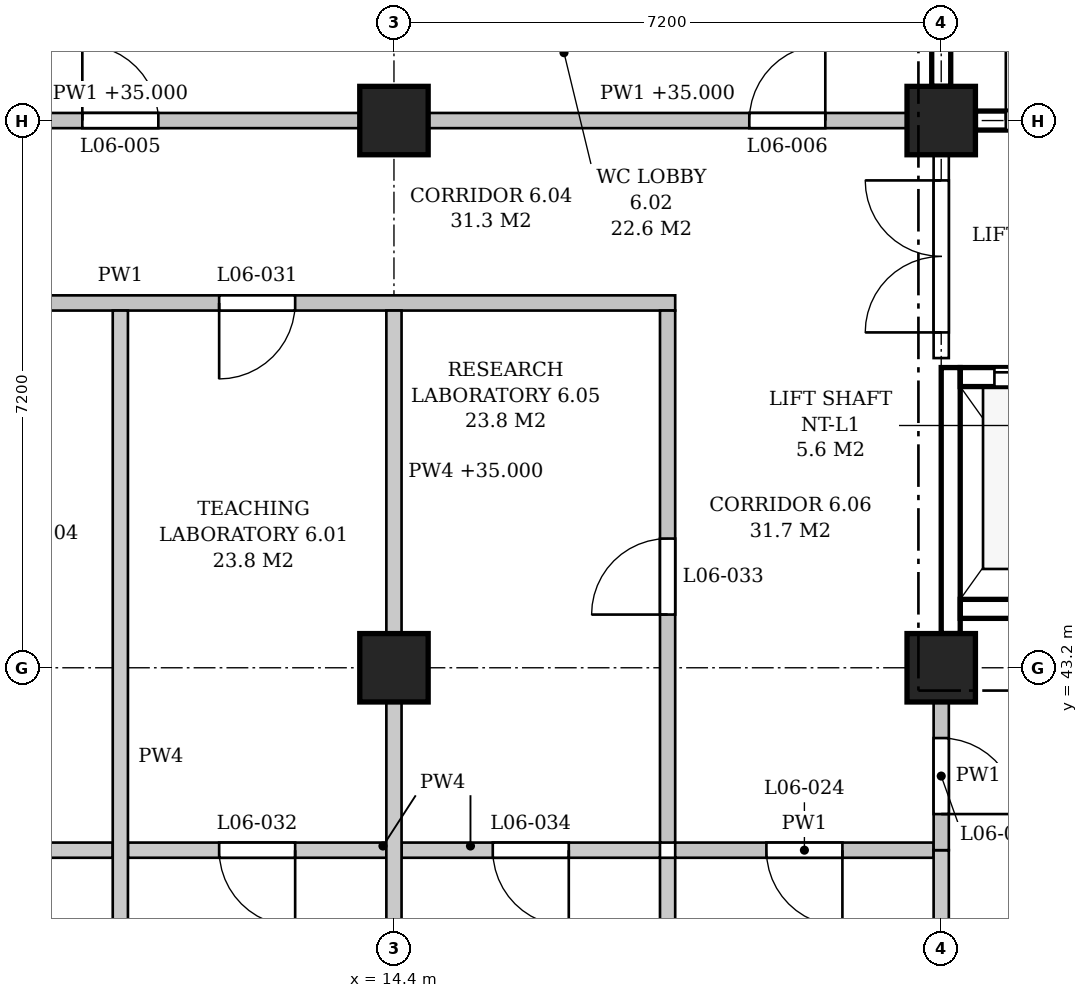
"""IFC4 building model, lengths in metres.
Left out: names, types, materials, properties, quantities, classifications, styles, units other than length and angle.
Written with IfcOpenShell. Run it as: python <this file> out.ifc"""

import sys

from ifc_helpers import new_model, si_unit, direction, frame, frame_2d, origin, origin_2d, place, context, subcontext, project, spatial, polyline, rectangle, outline, extrude, element, fill, save


model = new_model("IFC4")
c1 = context("Model", 3, precision=1e-05, world=origin(), true_north=direction((0.0, 1.0)))
c2 = subcontext(c1, "Body", "Model", "MODEL_VIEW")
j1 = project(units=[si_unit("LENGTHUNIT", "METRE"), si_unit("PLANEANGLEUNIT", "RADIAN")], contexts=[c1])
p1 = place(None, origin())
s1 = spatial("IfcSite", under=j1, at=p1, CompositionType="ELEMENT")
p2 = place(p1, origin())
s2 = spatial("IfcBuilding", under=s1, at=p2, CompositionType="ELEMENT")
p3 = place(p2, frame((0.0, 0.0, 31.2)))
s3 = spatial("IfcBuildingStorey", under=s2, at=p3, CompositionType="ELEMENT", Elevation=31.2)
for number, where, z_axis, x_axis in (
    (1, (14.4, 43.2, 0.0), (0.0, 0.0, 1.0), (1.0, 0.0, 0.0)),
    (2, (14.4, 50.4, 0.0), (0.0, 0.0, 1.0), (1.0, 0.0, 0.0)),
    (3, (21.6, 43.2, 0.0), (0.0, 0.0, 1.0), (1.0, 0.0, 0.0)),
    (4, (21.6, 50.4, 0.0), (0.0, 0.0, 1.0), (1.0, 0.0, 0.0)),
):
    element("IfcColumn", number, at=place(p3, frame(where, z_axis=z_axis, x_axis=x_axis)), inside=s3, PredefinedType="COLUMN", context=c2, shape_type="SweptSolid", body=[
        extrude(rectangle(XDim=0.9, YDim=0.9, at=origin_2d()), origin(), (0.0, 0.0, 1.0), 4.8),
    ])
p4 = place(p3, frame((22.05, 50.4, 0.0), z_axis=(0.0, 0.0, 1.0), x_axis=(1.0, 0.0, 0.0)))
e5 = element("IfcWall", 5, at=p4, inside=s3, PredefinedType="SHEAR", context=c2, shape_type="SweptSolid", body=[
    extrude(rectangle(XDim=6.3, YDim=0.25, at=frame_2d((3.15, 0.0))), origin(), (0.0, 0.0, 1.0), 3.8),
])
p5 = place(p4, frame((0.4, 0.0, 0.0)))
e6 = element("IfcOpeningElement", 6, at=p5, cuts=e5, PredefinedType="OPENING", context=c2, shape_type="SweptSolid", body=[
    extrude(rectangle(XDim=1.1, YDim=2.1, at=frame_2d((0.55, 1.05))), frame((0.0, 0.135, 0.0), z_axis=(0.0, -1.0, 0.0), x_axis=(1.0, 0.0, 0.0)), (0.0, 0.0, 1.0), 0.27),
])
p6 = place(p3, frame((21.6, 50.85, 0.0), z_axis=(0.0, 0.0, 1.0), x_axis=(0.0, 1.0, 0.0)))
e7 = element("IfcWall", 7, at=p6, inside=s3, PredefinedType="SHEAR", context=c2, shape_type="SweptSolid", body=[
    extrude(rectangle(XDim=6.3, YDim=0.25, at=frame_2d((3.15, 0.0))), origin(), (0.0, 0.0, 1.0), 3.8),
])
p7 = place(p3, frame((21.725, 43.65, -0.25), z_axis=(0.0, 0.0, 1.0), x_axis=(0.0, 1.0, 0.0)))
e8 = element("IfcWall", 8, at=p7, inside=s3, PredefinedType="SHEAR", context=c2, shape_type="SweptSolid", body=[
    extrude(rectangle(XDim=3.5, YDim=0.25, at=frame_2d((1.75, 0.0))), origin(), (0.0, 0.0, 1.0), 4.05),
])
p8 = place(p3, frame((21.85, 47.025, -0.25), z_axis=(0.0, 0.0, 1.0), x_axis=(1.0, 0.0, 0.0)))
e9 = element("IfcWall", 9, at=p8, inside=s3, PredefinedType="SHEAR", context=c2, shape_type="SweptSolid", body=[
    extrude(rectangle(XDim=2.0, YDim=0.25, at=frame_2d((1.0, 0.0))), origin(), (0.0, 0.0, 1.0), 4.8),
])
p9 = place(p8, frame((0.45, 0.0, 0.25)))
e10 = element("IfcOpeningElement", 10, at=p9, cuts=e9, PredefinedType="OPENING", context=c2, shape_type="SweptSolid", body=[
    extrude(rectangle(XDim=1.1, YDim=2.1, at=frame_2d((0.55, 1.05))), frame((0.0, 0.135, 0.0), z_axis=(0.0, -1.0, 0.0), x_axis=(1.0, 0.0, 0.0)), (0.0, 0.0, 1.0), 0.27),
])
p10 = place(p3, frame((21.85, 43.975, -0.25), z_axis=(0.0, 0.0, 1.0), x_axis=(1.0, 0.0, 0.0)))
e11 = element("IfcWall", 11, at=p10, inside=s3, PredefinedType="SHEAR", context=c2, shape_type="SweptSolid", body=[
    extrude(rectangle(XDim=2.0, YDim=0.25, at=frame_2d((1.0, 0.0))), origin(), (0.0, 0.0, 1.0), 4.8),
])
p11 = place(p3, frame((3.7, 40.8, 0.0), z_axis=(0.0, 0.0, 1.0), x_axis=(1.0, 0.0, 0.0)))
e12 = element("IfcWall", 12, at=p11, inside=s3, PredefinedType="PARTITIONING", context=c2, shape_type="SweptSolid", body=[
    extrude(outline(polyline([(0.0, 0.0), (7.0, 0.0), (7.0, 4.55), (3.75, 4.55), (3.75, 3.8), (3.25, 3.8), (3.25, 4.55), (0.0, 4.55), (0.0, 0.0)])), frame((0.0, 0.1, 0.0), z_axis=(0.0, -1.0, 0.0), x_axis=(1.0, 0.0, 0.0)), (0.0, 0.0, 1.0), 0.2),
])
p12 = place(p11, frame((1.25, 0.0, 0.0)))
e13 = element("IfcOpeningElement", 13, at=p12, cuts=e12, PredefinedType="OPENING", context=c2, shape_type="SweptSolid", body=[
    extrude(rectangle(XDim=1.0, YDim=2.1, at=frame_2d((0.5, 1.05))), frame((0.0, 0.11, 0.0), z_axis=(0.0, -1.0, 0.0), x_axis=(1.0, 0.0, 0.0)), (0.0, 0.0, 1.0), 0.22),
])
p13 = place(p11, frame((4.75, 0.0, 0.0)))
e14 = element("IfcOpeningElement", 14, at=p13, cuts=e12, PredefinedType="OPENING", context=c2, shape_type="SweptSolid", body=[
    extrude(rectangle(XDim=1.0, YDim=2.1, at=frame_2d((0.5, 1.05))), frame((0.0, 0.11, 0.0), z_axis=(0.0, -1.0, 0.0), x_axis=(1.0, 0.0, 0.0)), (0.0, 0.0, 1.0), 0.22),
])
p14 = place(p3, frame((10.9, 40.8, 0.0), z_axis=(0.0, 0.0, 1.0), x_axis=(1.0, 0.0, 0.0)))
e15 = element("IfcWall", 15, at=p14, inside=s3, PredefinedType="PARTITIONING", context=c2, shape_type="SweptSolid", body=[
    extrude(outline(polyline([(0.0, 0.0), (3.4, 0.0), (3.4, 3.8), (3.25, 3.8), (3.25, 4.55), (0.0, 4.55), (0.0, 0.0)])), frame((0.0, 0.1, 0.0), z_axis=(0.0, -1.0, 0.0), x_axis=(1.0, 0.0, 0.0)), (0.0, 0.0, 1.0), 0.2),
])
p15 = place(p14, frame((1.2, 0.0, 0.0)))
e16 = element("IfcOpeningElement", 16, at=p15, cuts=e15, PredefinedType="OPENING", context=c2, shape_type="SweptSolid", body=[
    extrude(rectangle(XDim=1.0, YDim=2.1, at=frame_2d((0.5, 1.05))), frame((0.0, 0.11, 0.0), z_axis=(0.0, -1.0, 0.0), x_axis=(1.0, 0.0, 0.0)), (0.0, 0.0, 1.0), 0.22),
])
p16 = place(p3, frame((14.5, 40.8, 0.0), z_axis=(0.0, 0.0, 1.0), x_axis=(1.0, 0.0, 0.0)))
e17 = element("IfcWall", 17, at=p16, inside=s3, PredefinedType="PARTITIONING", context=c2, shape_type="SweptSolid", body=[
    extrude(outline(polyline([(0.0, 0.0), (3.4, 0.0), (3.4, 4.55), (0.15, 4.55), (0.15, 3.8), (0.0, 3.8), (0.0, 0.0)])), frame((0.0, 0.1, 0.0), z_axis=(0.0, -1.0, 0.0), x_axis=(1.0, 0.0, 0.0)), (0.0, 0.0, 1.0), 0.2),
])
p17 = place(p16, frame((1.2, 0.0, 0.0)))
e18 = element("IfcOpeningElement", 18, at=p17, cuts=e17, PredefinedType="OPENING", context=c2, shape_type="SweptSolid", body=[
    extrude(rectangle(XDim=1.0, YDim=2.1, at=frame_2d((0.5, 1.05))), frame((0.0, 0.11, 0.0), z_axis=(0.0, -1.0, 0.0), x_axis=(1.0, 0.0, 0.0)), (0.0, 0.0, 1.0), 0.22),
])
p18 = place(p3, frame((18.1, 40.8, 0.0), z_axis=(0.0, 0.0, 1.0), x_axis=(1.0, 0.0, 0.0)))
e19 = element("IfcWall", 19, at=p18, inside=s3, PredefinedType="PARTITIONING", context=c2, shape_type="SweptSolid", body=[
    extrude(outline(polyline([(0.0, 0.0), (3.4, 0.0), (3.4, 3.8), (3.25, 3.8), (3.25, 4.55), (0.0, 4.55), (0.0, 0.0)])), frame((0.0, 0.1, 0.0), z_axis=(0.0, -1.0, 0.0), x_axis=(1.0, 0.0, 0.0)), (0.0, 0.0, 1.0), 0.2),
])
p19 = place(p18, frame((1.2, 0.0, 0.0)))
e20 = element("IfcOpeningElement", 20, at=p19, cuts=e19, PredefinedType="OPENING", context=c2, shape_type="SweptSolid", body=[
    extrude(rectangle(XDim=1.0, YDim=2.1, at=frame_2d((0.5, 1.05))), frame((0.0, 0.11, 0.0), z_axis=(0.0, -1.0, 0.0), x_axis=(1.0, 0.0, 0.0)), (0.0, 0.0, 1.0), 0.22),
])
p20 = place(p3, frame((3.5, 48.0, 0.0), z_axis=(0.0, 0.0, 1.0), x_axis=(1.0, 0.0, 0.0)))
e21 = element("IfcWall", 21, at=p20, inside=s3, PredefinedType="PARTITIONING", context=c2, shape_type="SweptSolid", body=[
    extrude(outline(polyline([(0.0, 0.0), (14.6, 0.0), (14.6, 4.55), (11.15, 4.55), (11.15, 3.8), (10.65, 3.8), (10.65, 4.55), (3.95, 4.55), (3.95, 3.8), (3.45, 3.8), (3.45, 4.55), (0.0, 4.55), (0.0, 0.0)])), frame((0.0, 0.1, 0.0), z_axis=(0.0, -1.0, 0.0), x_axis=(1.0, 0.0, 0.0)), (0.0, 0.0, 1.0), 0.2),
])
p21 = place(p20, frame((3.2, 0.0, 0.0)))
e22 = element("IfcOpeningElement", 22, at=p21, cuts=e21, PredefinedType="OPENING", context=c2, shape_type="SweptSolid", body=[
    extrude(rectangle(XDim=1.0, YDim=2.1, at=frame_2d((0.5, 1.05))), frame((0.0, 0.11, 0.0), z_axis=(0.0, -1.0, 0.0), x_axis=(1.0, 0.0, 0.0)), (0.0, 0.0, 1.0), 0.22),
])
p22 = place(p20, frame((8.6, 0.0, 0.0)))
e23 = element("IfcOpeningElement", 23, at=p22, cuts=e21, PredefinedType="OPENING", context=c2, shape_type="SweptSolid", body=[
    extrude(rectangle(XDim=1.0, YDim=2.1, at=frame_2d((0.5, 1.05))), frame((0.0, 0.11, 0.0), z_axis=(0.0, -1.0, 0.0), x_axis=(1.0, 0.0, 0.0)), (0.0, 0.0, 1.0), 0.22),
])
p23 = place(p3, frame((7.65, 50.4, 0.0), z_axis=(0.0, 0.0, 1.0), x_axis=(1.0, 0.0, 0.0)))
e24 = element("IfcWall", 24, at=p23, inside=s3, PredefinedType="PARTITIONING", context=c2, shape_type="SweptSolid", body=[
    extrude(rectangle(XDim=6.3, YDim=0.2, at=frame_2d((3.15, 0.0))), origin(), (0.0, 0.0, 1.0), 3.8),
])
p24 = place(p23, frame((2.65, 0.0, 0.0)))
e25 = element("IfcOpeningElement", 25, at=p24, cuts=e24, PredefinedType="OPENING", context=c2, shape_type="SweptSolid", body=[
    extrude(rectangle(XDim=1.0, YDim=2.1, at=frame_2d((0.5, 1.05))), frame((0.0, 0.11, 0.0), z_axis=(0.0, -1.0, 0.0), x_axis=(1.0, 0.0, 0.0)), (0.0, 0.0, 1.0), 0.22),
])
p25 = place(p3, frame((14.85, 50.4, 0.0), z_axis=(0.0, 0.0, 1.0), x_axis=(1.0, 0.0, 0.0)))
e26 = element("IfcWall", 26, at=p25, inside=s3, PredefinedType="PARTITIONING", context=c2, shape_type="SweptSolid", body=[
    extrude(rectangle(XDim=6.3, YDim=0.2, at=frame_2d((3.15, 0.0))), origin(), (0.0, 0.0, 1.0), 3.8),
])
p26 = place(p25, frame((4.225, 0.0, 0.0)))
e27 = element("IfcOpeningElement", 27, at=p26, cuts=e26, PredefinedType="OPENING", context=c2, shape_type="SweptSolid", body=[
    extrude(rectangle(XDim=1.0, YDim=2.1, at=frame_2d((0.5, 1.05))), frame((0.0, 0.11, 0.0), z_axis=(0.0, -1.0, 0.0), x_axis=(1.0, 0.0, 0.0)), (0.0, 0.0, 1.0), 0.22),
])
p27 = place(p3, frame((10.8, 36.15, 0.0), z_axis=(0.0, 0.0, 1.0), x_axis=(0.0, 1.0, 0.0)))
e28 = element("IfcWall", 28, at=p27, inside=s3, PredefinedType="PARTITIONING", context=c2, shape_type="SweptSolid", body=[
    extrude(outline(polyline([(0.0, 0.0), (11.75, 0.0), (11.75, 4.55), (7.3, 4.55), (7.3, 3.8), (6.8, 3.8), (6.8, 4.55), (0.1, 4.55), (0.1, 3.95), (0.0, 3.95), (0.0, 0.0)])), frame((0.0, 0.1, 0.0), z_axis=(0.0, -1.0, 0.0), x_axis=(1.0, 0.0, 0.0)), (0.0, 0.0, 1.0), 0.2),
])
p28 = place(p3, frame((14.4, 36.45, 0.0), z_axis=(0.0, 0.0, 1.0), x_axis=(0.0, 1.0, 0.0)))
e29 = element("IfcWall", 29, at=p28, inside=s3, PredefinedType="PARTITIONING", context=c2, shape_type="SweptSolid", body=[
    extrude(rectangle(XDim=6.3, YDim=0.2, at=frame_2d((3.15, 0.0))), origin(), (0.0, 0.0, 1.0), 3.8),
])
p29 = place(p3, frame((14.4, 43.65, 0.0), z_axis=(0.0, 0.0, 1.0), x_axis=(0.0, 1.0, 0.0)))
e30 = element("IfcWall", 30, at=p29, inside=s3, PredefinedType="PARTITIONING", context=c2, shape_type="SweptSolid", body=[
    extrude(rectangle(XDim=4.25, YDim=0.2, at=frame_2d((2.125, 0.0))), origin(), (0.0, 0.0, 1.0), 3.8),
])
p30 = place(p3, frame((18.0, 36.15, 0.0), z_axis=(0.0, 0.0, 1.0), x_axis=(0.0, 1.0, 0.0)))
e31 = element("IfcWall", 31, at=p30, inside=s3, PredefinedType="PARTITIONING", context=c2, shape_type="SweptSolid", body=[
    extrude(outline(polyline([(0.0, 0.0), (4.55, 0.0), (4.55, 4.55), (0.1, 4.55), (0.1, 3.95), (0.0, 3.95), (0.0, 0.0)])), frame((0.0, 0.1, 0.0), z_axis=(0.0, -1.0, 0.0), x_axis=(1.0, 0.0, 0.0)), (0.0, 0.0, 1.0), 0.2),
])
p31 = place(p3, frame((18.0, 40.9, 0.0), z_axis=(0.0, 0.0, 1.0), x_axis=(0.0, 1.0, 0.0)))
e32 = element("IfcWall", 32, at=p31, inside=s3, PredefinedType="PARTITIONING", context=c2, shape_type="SweptSolid", body=[
    extrude(outline(polyline([(0.0, 0.0), (7.0, 0.0), (7.0, 4.55), (2.55, 4.55), (2.55, 3.8), (2.05, 3.8), (2.05, 4.55), (0.0, 4.55), (0.0, 0.0)])), frame((0.0, 0.1, 0.0), z_axis=(0.0, -1.0, 0.0), x_axis=(1.0, 0.0, 0.0)), (0.0, 0.0, 1.0), 0.2),
])
p32 = place(p31, frame((3.0, 0.0, 0.0)))
e33 = element("IfcOpeningElement", 33, at=p32, cuts=e32, PredefinedType="OPENING", context=c2, shape_type="SweptSolid", body=[
    extrude(rectangle(XDim=1.0, YDim=2.1, at=frame_2d((0.5, 1.05))), frame((0.0, 0.11, 0.0), z_axis=(0.0, -1.0, 0.0), x_axis=(1.0, 0.0, 0.0)), (0.0, 0.0, 1.0), 0.22),
])
p33 = place(p3, frame((21.6, 36.45, 0.0), z_axis=(0.0, 0.0, 1.0), x_axis=(0.0, 1.0, 0.0)))
e34 = element("IfcWall", 34, at=p33, inside=s3, PredefinedType="PARTITIONING", context=c2, shape_type="SweptSolid", body=[
    extrude(rectangle(XDim=4.35, YDim=0.2, at=frame_2d((2.175, 0.0))), origin(), (0.0, 0.0, 1.0), 3.8),
])
p34 = place(p3, frame((21.6, 40.8, 0.0), z_axis=(0.0, 0.0, 1.0), x_axis=(0.0, 1.0, 0.0)))
e35 = element("IfcWall", 35, at=p34, inside=s3, PredefinedType="PARTITIONING", context=c2, shape_type="SweptSolid", body=[
    extrude(rectangle(XDim=1.95, YDim=0.2, at=frame_2d((0.975, 0.0))), origin(), (0.0, 0.0, 1.0), 3.8),
])
p35 = place(p34, frame((0.475, 0.0, 0.0)))
e36 = element("IfcOpeningElement", 36, at=p35, cuts=e35, PredefinedType="OPENING", context=c2, shape_type="SweptSolid", body=[
    extrude(rectangle(XDim=1.0, YDim=2.1, at=frame_2d((0.5, 1.05))), frame((0.0, 0.11, 0.0), z_axis=(0.0, -1.0, 0.0), x_axis=(1.0, 0.0, 0.0)), (0.0, 0.0, 1.0), 0.22),
])
p36 = place(p3, frame((21.6, 47.275, 0.0), z_axis=(0.0, 0.0, 1.0), x_axis=(0.0, 1.0, 0.0)))
e37 = element("IfcWall", 37, at=p36, inside=s3, PredefinedType="PARTITIONING", context=c2, shape_type="SweptSolid", body=[
    extrude(rectangle(XDim=2.675, YDim=0.2, at=frame_2d((1.337, 0.0))), origin(), (0.0, 0.0, 1.0), 3.8),
])
p37 = place(p36, frame((0.337, 0.0, 0.0)))
e38 = element("IfcOpeningElement", 38, at=p37, cuts=e37, PredefinedType="OPENING", context=c2, shape_type="SweptSolid", body=[
    extrude(rectangle(XDim=2.0, YDim=2.4, at=frame_2d((1.0, 1.2))), frame((0.0, 0.11, 0.0), z_axis=(0.0, -1.0, 0.0), x_axis=(1.0, 0.0, 0.0)), (0.0, 0.0, 1.0), 0.22),
])
p38 = place(p5, origin())
e39 = element("IfcDoor", 39, at=p38, inside=s3, OperationType="SINGLE_SWING_LEFT", PredefinedType="DOOR", context=c2, shape_type="SweptSolid", body=[
    extrude(rectangle(XDim=1.1, YDim=2.1, at=frame_2d((0.55, 1.05))), frame((0.0, 0.025, 0.0), z_axis=(0.0, -1.0, 0.0), x_axis=(1.0, 0.0, 0.0)), (0.0, 0.0, 1.0), 0.05),
])
fill(e6, e39)
p39 = place(p9, origin())
e40 = element("IfcDoor", 40, at=p39, inside=s3, OperationType="SLIDING_TO_LEFT", PredefinedType="DOOR", context=c2, shape_type="SweptSolid", body=[
    extrude(rectangle(XDim=1.1, YDim=2.1, at=frame_2d((0.55, 1.05))), frame((0.0, 0.025, 0.0), z_axis=(0.0, -1.0, 0.0), x_axis=(1.0, 0.0, 0.0)), (0.0, 0.0, 1.0), 0.05),
])
fill(e10, e40)
p40 = place(p37, origin())
e41 = element("IfcDoor", 41, at=p40, inside=s3, OperationType="DOUBLE_DOOR_SINGLE_SWING", PredefinedType="DOOR", context=c2, shape_type="SweptSolid", body=[
    extrude(rectangle(XDim=2.0, YDim=2.4, at=frame_2d((1.0, 1.2))), frame((0.0, 0.025, 0.0), z_axis=(0.0, -1.0, 0.0), x_axis=(1.0, 0.0, 0.0)), (0.0, 0.0, 1.0), 0.05),
])
fill(e38, e41)
p41 = place(p24, origin())
e42 = element("IfcDoor", 42, at=p41, inside=s3, OperationType="SINGLE_SWING_LEFT", PredefinedType="DOOR", context=c2, shape_type="SweptSolid", body=[
    extrude(rectangle(XDim=1.0, YDim=2.1, at=frame_2d((0.5, 1.05))), frame((0.0, 0.025, 0.0), z_axis=(0.0, -1.0, 0.0), x_axis=(1.0, 0.0, 0.0)), (0.0, 0.0, 1.0), 0.05),
])
fill(e25, e42)
p42 = place(p26, origin())
e43 = element("IfcDoor", 43, at=p42, inside=s3, OperationType="SINGLE_SWING_RIGHT", PredefinedType="DOOR", context=c2, shape_type="SweptSolid", body=[
    extrude(rectangle(XDim=1.0, YDim=2.1, at=frame_2d((0.5, 1.05))), frame((0.0, 0.025, 0.0), z_axis=(0.0, -1.0, 0.0), x_axis=(1.0, 0.0, 0.0)), (0.0, 0.0, 1.0), 0.05),
])
fill(e27, e43)
p43 = place(p19, frame((1.0, 0.0, 0.0), z_axis=(0.0, 0.0, 1.0), x_axis=(-1.0, 0.0, 0.0)))
e44 = element("IfcDoor", 44, at=p43, inside=s3, OperationType="SINGLE_SWING_LEFT", PredefinedType="DOOR", context=c2, shape_type="SweptSolid", body=[
    extrude(rectangle(XDim=1.0, YDim=2.1, at=frame_2d((0.5, 1.05))), frame((0.0, 0.025, 0.0), z_axis=(0.0, -1.0, 0.0), x_axis=(1.0, 0.0, 0.0)), (0.0, 0.0, 1.0), 0.05),
])
fill(e20, e44)
p44 = place(p35, frame((1.0, 0.0, 0.0), z_axis=(0.0, 0.0, 1.0), x_axis=(-1.0, 0.0, 0.0)))
e45 = element("IfcDoor", 45, at=p44, inside=s3, OperationType="SINGLE_SWING_RIGHT", PredefinedType="DOOR", context=c2, shape_type="SweptSolid", body=[
    extrude(rectangle(XDim=1.0, YDim=2.1, at=frame_2d((0.5, 1.05))), frame((0.0, 0.025, 0.0), z_axis=(0.0, -1.0, 0.0), x_axis=(1.0, 0.0, 0.0)), (0.0, 0.0, 1.0), 0.05),
])
fill(e36, e45)
p45 = place(p22, frame((1.0, 0.0, 0.0), z_axis=(0.0, 0.0, 1.0), x_axis=(-1.0, 0.0, 0.0)))
e46 = element("IfcDoor", 46, at=p45, inside=s3, OperationType="SINGLE_SWING_RIGHT", PredefinedType="DOOR", context=c2, shape_type="SweptSolid", body=[
    extrude(rectangle(XDim=1.0, YDim=2.1, at=frame_2d((0.5, 1.05))), frame((0.0, 0.025, 0.0), z_axis=(0.0, -1.0, 0.0), x_axis=(1.0, 0.0, 0.0)), (0.0, 0.0, 1.0), 0.05),
])
fill(e23, e46)
p46 = place(p15, frame((1.0, 0.0, 0.0), z_axis=(0.0, 0.0, 1.0), x_axis=(-1.0, 0.0, 0.0)))
e47 = element("IfcDoor", 47, at=p46, inside=s3, OperationType="SINGLE_SWING_LEFT", PredefinedType="DOOR", context=c2, shape_type="SweptSolid", body=[
    extrude(rectangle(XDim=1.0, YDim=2.1, at=frame_2d((0.5, 1.05))), frame((0.0, 0.025, 0.0), z_axis=(0.0, -1.0, 0.0), x_axis=(1.0, 0.0, 0.0)), (0.0, 0.0, 1.0), 0.05),
])
fill(e16, e47)
p47 = place(p32, origin())
e48 = element("IfcDoor", 48, at=p47, inside=s3, OperationType="SINGLE_SWING_LEFT", PredefinedType="DOOR", context=c2, shape_type="SweptSolid", body=[
    extrude(rectangle(XDim=1.0, YDim=2.1, at=frame_2d((0.5, 1.05))), frame((0.0, 0.025, 0.0), z_axis=(0.0, -1.0, 0.0), x_axis=(1.0, 0.0, 0.0)), (0.0, 0.0, 1.0), 0.05),
])
fill(e33, e48)
p48 = place(p17, frame((1.0, 0.0, 0.0), z_axis=(0.0, 0.0, 1.0), x_axis=(-1.0, 0.0, 0.0)))
e49 = element("IfcDoor", 49, at=p48, inside=s3, OperationType="SINGLE_SWING_LEFT", PredefinedType="DOOR", context=c2, shape_type="SweptSolid", body=[
    extrude(rectangle(XDim=1.0, YDim=2.1, at=frame_2d((0.5, 1.05))), frame((0.0, 0.025, 0.0), z_axis=(0.0, -1.0, 0.0), x_axis=(1.0, 0.0, 0.0)), (0.0, 0.0, 1.0), 0.05),
])
fill(e18, e49)
save(model, sys.argv[1])
